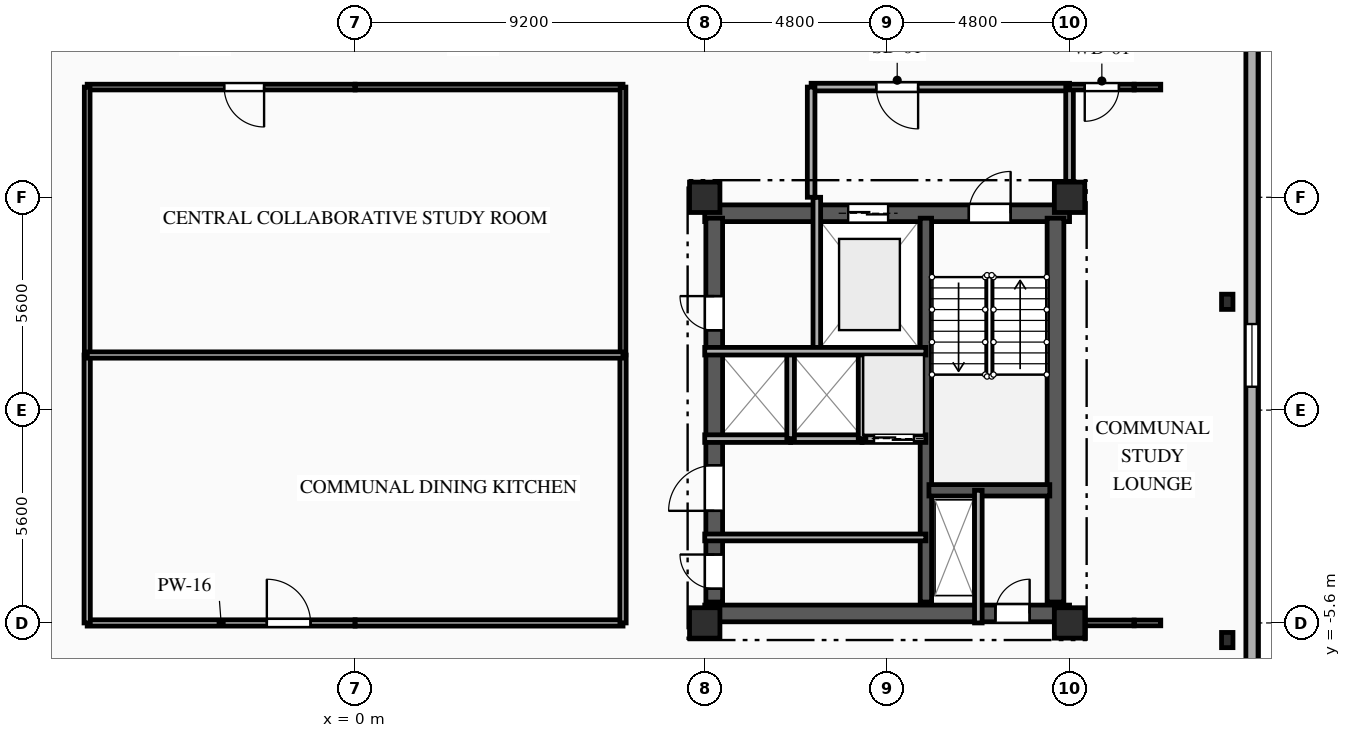
"""IFC4 building model, lengths in metres.
Left out: names, types, materials, properties, quantities, classifications, styles, units other than length and angle.
Written with IfcOpenShell. Run it as: python <this file> out.ifc"""

import sys

from ifc_helpers import new_model, si_unit, direction, frame, frame_2d, origin, origin_2d, place, context, subcontext, project, spatial, rectangle, i_section, extrude, element, fill, save


model = new_model("IFC4")
c1 = context("Model", 3, precision=1e-05, world=origin(), true_north=direction((0.0, 1.0)))
c2 = subcontext(c1, "Body", "Model", "MODEL_VIEW")
j1 = project(units=[si_unit("LENGTHUNIT", "METRE"), si_unit("PLANEANGLEUNIT", "RADIAN")], contexts=[c1])
p1 = place(None, origin())
s1 = spatial("IfcSite", under=j1, at=p1, CompositionType="ELEMENT")
p2 = place(p1, origin())
s2 = spatial("IfcBuilding", under=s1, at=p2, CompositionType="ELEMENT")
p3 = place(p2, frame((0.0, 0.0, 228.3)))
s3 = spatial("IfcBuildingStorey", under=s2, at=p3, CompositionType="ELEMENT", Elevation=228.3)
for number, where, z_axis, x_axis in (
    (1, (9.2, -5.6, 0.0), (0.0, 0.0, 1.0), (1.0, 0.0, 0.0)),
    (2, (9.2, 5.6, 0.0), (0.0, 0.0, 1.0), (1.0, 0.0, 0.0)),
    (3, (18.8, -5.6, 0.0), (0.0, 0.0, 1.0), (1.0, 0.0, 0.0)),
    (4, (18.8, 5.6, 0.0), (0.0, 0.0, 1.0), (1.0, 0.0, 0.0)),
):
    element("IfcColumn", number, at=place(p3, frame(where, z_axis=z_axis, x_axis=x_axis)), inside=s3, PredefinedType="COLUMN", context=c2, shape_type="SweptSolid", body=[
        extrude(rectangle(XDim=0.8, YDim=0.8, at=origin_2d()), origin(), (0.0, 0.0, 1.0), 3.35),
    ])
for number, where, z_axis, x_axis in (
    (5, (22.95, -6.05, 0.0), (0.0, 0.0, 1.0), (1.0, 0.0, 0.0)),
    (6, (22.95, 2.85, 0.0), (0.0, 0.0, 1.0), (1.0, 0.0, 0.0)),
):
    element("IfcColumn", number, at=place(p3, frame(where, z_axis=z_axis, x_axis=x_axis)), inside=s3, PredefinedType="COLUMN", context=c2, shape_type="SweptSolid", body=[
        extrude(i_section(OverallWidth=0.3, OverallDepth=0.4, WebThickness=0.013, FlangeThickness=0.024, FilletRadius=0.027, at=origin_2d()), origin(), (0.0, 0.0, 1.0), 3.35),
    ])
p4 = place(p3, frame((23.6, 12.4, 0.0), z_axis=(0.0, 0.0, 1.0), x_axis=(0.0, -1.0, 0.0)))
e7 = element("IfcWall", 7, at=p4, inside=s3, PredefinedType="SOLIDWALL", context=c2, shape_type="SweptSolid", body=[
    extrude(rectangle(XDim=28.0, YDim=0.32, at=frame_2d((14.0, 0.0))), origin(), (0.0, 0.0, 1.0), 3.04),
])
p5 = place(p4, frame((10.135, 0.0, 0.85)))
e8 = element("IfcOpeningElement", 8, at=p5, cuts=e7, PredefinedType="OPENING", context=c2, shape_type="SweptSolid", body=[
    extrude(rectangle(XDim=1.65, YDim=1.85, at=frame_2d((0.825, 0.925))), frame((0.0, 0.17, 0.0), z_axis=(0.0, -1.0, 0.0), x_axis=(1.0, 0.0, 0.0)), (0.0, 0.0, 1.0), 0.34),
])
p6 = place(p3, frame((9.2, 5.18, 0.0), z_axis=(0.0, 0.0, 1.0), x_axis=(1.0, 0.0, 0.0)))
e9 = element("IfcWall", 9, at=p6, inside=s3, PredefinedType="SHEAR", context=c2, shape_type="SweptSolid", body=[
    extrude(rectangle(XDim=9.6, YDim=0.44, at=frame_2d((4.8, 0.0))), origin(), (0.0, 0.0, 1.0), 3.04),
])
p7 = place(p6, frame((6.95, 0.0, 0.0)))
e10 = element("IfcOpeningElement", 10, at=p7, cuts=e9, PredefinedType="OPENING", context=c2, shape_type="SweptSolid", body=[
    extrude(rectangle(XDim=1.1, YDim=2.15, at=frame_2d((0.55, 1.075))), frame((0.0, 0.23, 0.0), z_axis=(0.0, -1.0, 0.0), x_axis=(1.0, 0.0, 0.0)), (0.0, 0.0, 1.0), 0.46),
])
p8 = place(p6, frame((3.775, 0.0, 0.0)))
e11 = element("IfcOpeningElement", 11, at=p8, cuts=e9, PredefinedType="OPENING", context=c2, shape_type="SweptSolid", body=[
    extrude(rectangle(XDim=1.05, YDim=2.1, at=frame_2d((0.525, 1.05))), frame((0.0, 0.23, 0.0), z_axis=(0.0, -1.0, 0.0), x_axis=(1.0, 0.0, 0.0)), (0.0, 0.0, 1.0), 0.46),
])
p9 = place(p3, frame((9.2, -5.35, 0.0), z_axis=(0.0, 0.0, 1.0), x_axis=(1.0, 0.0, 0.0)))
e12 = element("IfcWall", 12, at=p9, inside=s3, PredefinedType="SHEAR", context=c2, shape_type="SweptSolid", body=[
    extrude(rectangle(XDim=9.6, YDim=0.44, at=frame_2d((4.8, 0.0))), origin(), (0.0, 0.0, 1.0), 3.04),
])
p10 = place(p9, frame((7.65, 0.0, 0.0)))
e13 = element("IfcOpeningElement", 13, at=p10, cuts=e12, PredefinedType="OPENING", context=c2, shape_type="SweptSolid", body=[
    extrude(rectangle(XDim=0.9, YDim=2.1, at=frame_2d((0.45, 1.05))), frame((0.0, 0.23, 0.0), z_axis=(0.0, -1.0, 0.0), x_axis=(1.0, 0.0, 0.0)), (0.0, 0.0, 1.0), 0.46),
])
p11 = place(p3, frame((9.45, -5.05, 0.0), z_axis=(0.0, 0.0, 1.0), x_axis=(0.0, 1.0, 0.0)))
e14 = element("IfcWall", 14, at=p11, inside=s3, PredefinedType="SHEAR", context=c2, shape_type="SweptSolid", body=[
    extrude(rectangle(XDim=10.1, YDim=0.44, at=frame_2d((5.05, 0.0))), origin(), (0.0, 0.0, 1.0), 3.04),
])
p12 = place(p11, frame((7.15, 0.0, 0.0)))
e15 = element("IfcOpeningElement", 15, at=p12, cuts=e14, PredefinedType="OPENING", context=c2, shape_type="SweptSolid", body=[
    extrude(rectangle(XDim=0.9, YDim=2.1, at=frame_2d((0.45, 1.05))), frame((0.0, 0.23, 0.0), z_axis=(0.0, -1.0, 0.0), x_axis=(1.0, 0.0, 0.0)), (0.0, 0.0, 1.0), 0.46),
])
p13 = place(p11, frame((2.4, 0.0, 0.0)))
e16 = element("IfcOpeningElement", 16, at=p13, cuts=e14, PredefinedType="OPENING", context=c2, shape_type="SweptSolid", body=[
    extrude(rectangle(XDim=1.2, YDim=2.15, at=frame_2d((0.6, 1.075))), frame((0.0, 0.23, 0.0), z_axis=(0.0, -1.0, 0.0), x_axis=(1.0, 0.0, 0.0)), (0.0, 0.0, 1.0), 0.46),
])
p14 = place(p11, frame((0.35, 0.0, 0.0)))
e17 = element("IfcOpeningElement", 17, at=p14, cuts=e14, PredefinedType="OPENING", context=c2, shape_type="SweptSolid", body=[
    extrude(rectangle(XDim=0.9, YDim=2.1, at=frame_2d((0.45, 1.05))), frame((0.0, 0.23, 0.0), z_axis=(0.0, -1.0, 0.0), x_axis=(1.0, 0.0, 0.0)), (0.0, 0.0, 1.0), 0.46),
])
p15 = place(p3, frame((18.43, -5.05, 0.0), z_axis=(0.0, 0.0, 1.0), x_axis=(0.0, 1.0, 0.0)))
e18 = element("IfcWall", 18, at=p15, inside=s3, PredefinedType="SHEAR", context=c2, shape_type="SweptSolid", body=[
    extrude(rectangle(XDim=10.1, YDim=0.44, at=frame_2d((5.05, 0.0))), origin(), (0.0, 0.0, 1.0), 3.04),
])
p16 = place(p3, frame((15.02, -5.05, 0.0), z_axis=(0.0, 0.0, 1.0), x_axis=(0.0, 1.0, 0.0)))
e19 = element("IfcWall", 19, at=p16, inside=s3, PredefinedType="SHEAR", context=c2, shape_type="SweptSolid", body=[
    extrude(rectangle(XDim=10.1, YDim=0.3, at=frame_2d((5.05, 0.0))), origin(), (0.0, 0.0, 1.0), 3.04),
])
p17 = place(p3, frame((15.1, -2.11, 0.0), z_axis=(0.0, 0.0, 1.0), x_axis=(1.0, 0.0, 0.0)))
e20 = element("IfcWall", 20, at=p17, inside=s3, PredefinedType="SHEAR", context=c2, shape_type="SweptSolid", body=[
    extrude(rectangle(XDim=3.18, YDim=0.3, at=frame_2d((1.59, 0.0))), origin(), (0.0, 0.0, 1.0), 3.04),
])
p18 = place(p3, frame((16.4, -2.11, 0.0), z_axis=(0.0, 0.0, 1.0), x_axis=(0.0, -1.0, 0.0)))
e21 = element("IfcWall", 21, at=p18, inside=s3, PredefinedType="PARTITIONING", context=c2, shape_type="SweptSolid", body=[
    extrude(rectangle(XDim=3.49, YDim=0.2, at=frame_2d((1.745, 0.0))), origin(), (0.0, 0.0, 1.0), 3.04),
])
p19 = place(p3, frame((12.15, 5.6, 0.0), z_axis=(0.0, 0.0, 1.0), x_axis=(0.0, -1.0, 0.0)))
e22 = element("IfcWall", 22, at=p19, inside=s3, PredefinedType="PARTITIONING", context=c2, shape_type="SweptSolid", body=[
    extrude(rectangle(XDim=4.05, YDim=0.2, at=frame_2d((2.025, 0.0))), origin(), (0.0, 0.0, 1.0), 3.04),
])
p20 = place(p3, frame((18.8, 8.5, 0.0), z_axis=(0.0, 0.0, 1.0), x_axis=(-1.0, 0.0, 0.0)))
e23 = element("IfcWall", 23, at=p20, inside=s3, PredefinedType="PARTITIONING", context=c2, shape_type="SweptSolid", body=[
    extrude(rectangle(XDim=6.8, YDim=0.2, at=frame_2d((3.4, 0.0))), origin(), (0.0, 0.0, 1.0), 3.04),
])
p21 = place(p20, frame((3.985, 0.0, 0.0)))
e24 = element("IfcOpeningElement", 24, at=p21, cuts=e23, PredefinedType="OPENING", context=c2, shape_type="SweptSolid", body=[
    extrude(rectangle(XDim=1.1, YDim=2.15, at=frame_2d((0.55, 1.075))), frame((0.0, 0.11, 0.0), z_axis=(0.0, -1.0, 0.0), x_axis=(1.0, 0.0, 0.0)), (0.0, 0.0, 1.0), 0.22),
])
p22 = place(p3, frame((12.0, 8.5, 0.0), z_axis=(0.0, 0.0, 1.0), x_axis=(0.0, -1.0, 0.0)))
e25 = element("IfcWall", 25, at=p22, inside=s3, PredefinedType="PARTITIONING", context=c2, shape_type="SweptSolid", body=[
    extrude(rectangle(XDim=2.9, YDim=0.2, at=frame_2d((1.45, 0.0))), origin(), (0.0, 0.0, 1.0), 3.04),
])
p23 = place(p3, frame((18.8, 5.6, 0.0), z_axis=(0.0, 0.0, 1.0), x_axis=(0.0, 1.0, 0.0)))
e26 = element("IfcWall", 26, at=p23, inside=s3, PredefinedType="PARTITIONING", context=c2, shape_type="SweptSolid", body=[
    extrude(rectangle(XDim=2.9, YDim=0.2, at=frame_2d((1.45, 0.0))), origin(), (0.0, 0.0, 1.0), 2.665),
])
p24 = place(p3, frame((9.2, -3.35, 0.0), z_axis=(0.0, 0.0, 1.0), x_axis=(1.0, 0.0, 0.0)))
e27 = element("IfcWall", 27, at=p24, inside=s3, PredefinedType="PARTITIONING", context=c2, shape_type="SweptSolid", body=[
    extrude(rectangle(XDim=5.82, YDim=0.18, at=frame_2d((2.91, 0.0))), origin(), (0.0, 0.0, 1.0), 2.755),
])
p25 = place(p3, frame((11.46, -0.75, 0.0), z_axis=(0.0, 0.0, 1.0), x_axis=(-1.0, 0.0, 0.0)))
e28 = element("IfcWall", 28, at=p25, inside=s3, PredefinedType="PARTITIONING", context=c2, shape_type="SweptSolid", body=[
    extrude(rectangle(XDim=2.26, YDim=0.2, at=frame_2d((1.13, 0.0))), origin(), (0.0, 0.0, 1.0), 3.04),
])
p26 = place(p3, frame((13.34, -0.75, 0.0), z_axis=(0.0, 0.0, 1.0), x_axis=(-1.0, 0.0, 0.0)))
e29 = element("IfcWall", 29, at=p26, inside=s3, PredefinedType="PARTITIONING", context=c2, shape_type="SweptSolid", body=[
    extrude(rectangle(XDim=1.88, YDim=0.2, at=frame_2d((0.94, 0.0))), origin(), (0.0, 0.0, 1.0), 3.04),
])
p27 = place(p3, frame((15.02, -0.75, 0.0), z_axis=(0.0, 0.0, 1.0), x_axis=(-1.0, 0.0, 0.0)))
e30 = element("IfcWall", 30, at=p27, inside=s3, PredefinedType="PARTITIONING", context=c2, shape_type="SweptSolid", body=[
    extrude(rectangle(XDim=1.68, YDim=0.2, at=frame_2d((0.84, 0.0))), origin(), (0.0, 0.0, 1.0), 3.04),
])
p28 = place(p27, frame((0.315, 0.0, 0.0)))
e31 = element("IfcOpeningElement", 31, at=p28, cuts=e30, PredefinedType="OPENING", context=c2, shape_type="SweptSolid", body=[
    extrude(rectangle(XDim=1.05, YDim=2.1, at=frame_2d((0.525, 1.05))), frame((0.0, 0.11, 0.0), z_axis=(0.0, -1.0, 0.0), x_axis=(1.0, 0.0, 0.0)), (0.0, 0.0, 1.0), 0.22),
])
for number, where, z_axis, x_axis in (
    (32, (11.46, -0.75, 0.0), (0.0, 0.0, 1.0), (0.0, 1.0, 0.0)),
    (33, (13.34, -0.75, 0.0), (0.0, 0.0, 1.0), (0.0, 1.0, 0.0)),
):
    element("IfcWall", number, at=place(p3, frame(where, z_axis=z_axis, x_axis=x_axis)), inside=s3, PredefinedType="PARTITIONING", context=c2, shape_type="SweptSolid", body=[
        extrude(rectangle(XDim=2.3, YDim=0.2, at=frame_2d((1.15, 0.0))), origin(), (0.0, 0.0, 1.0), 3.04),
    ])
p29 = place(p3, frame((0.0, 8.5, 0.0), z_axis=(0.0, 0.0, 1.0), x_axis=(-1.0, 0.0, 0.0)))
e34 = element("IfcWall", 34, at=p29, inside=s3, PredefinedType="PARTITIONING", context=c2, shape_type="SweptSolid", body=[
    extrude(rectangle(XDim=7.05, YDim=0.15, at=frame_2d((3.525, 0.0))), origin(), (0.0, 0.0, 1.0), 3.04),
])
p30 = place(p29, frame((2.395, 0.0, 0.0)))
e35 = element("IfcOpeningElement", 35, at=p30, cuts=e34, PredefinedType="OPENING", context=c2, shape_type="SweptSolid", body=[
    extrude(rectangle(XDim=1.05, YDim=2.15, at=frame_2d((0.525, 1.075))), frame((0.0, 0.085, 0.0), z_axis=(0.0, -1.0, 0.0), x_axis=(1.0, 0.0, 0.0)), (0.0, 0.0, 1.0), 0.17),
])
p31 = place(p3, frame((20.5, 8.5, 0.0), z_axis=(0.0, 0.0, 1.0), x_axis=(-1.0, 0.0, 0.0)))
e36 = element("IfcWall", 36, at=p31, inside=s3, PredefinedType="PARTITIONING", context=c2, shape_type="SweptSolid", body=[
    extrude(rectangle(XDim=1.7, YDim=0.15, at=frame_2d((0.85, 0.0))), origin(), (0.0, 0.0, 1.0), 3.04),
])
p32 = place(p31, frame((0.4, 0.0, 0.0)))
e37 = element("IfcOpeningElement", 37, at=p32, cuts=e36, PredefinedType="OPENING", context=c2, shape_type="SweptSolid", body=[
    extrude(rectangle(XDim=0.9, YDim=2.1, at=frame_2d((0.45, 1.05))), frame((0.0, 0.085, 0.0), z_axis=(0.0, -1.0, 0.0), x_axis=(1.0, 0.0, 0.0)), (0.0, 0.0, 1.0), 0.17),
])
p33 = place(p3, frame((21.2, 8.5, 0.0), z_axis=(0.0, 0.0, 1.0), x_axis=(-1.0, 0.0, 0.0)))
e38 = element("IfcWall", 38, at=p33, inside=s3, PredefinedType="PARTITIONING", context=c2, shape_type="SweptSolid", body=[
    extrude(rectangle(XDim=0.7, YDim=0.15, at=frame_2d((0.35, 0.0))), origin(), (0.0, 0.0, 1.0), 3.04),
])
p34 = place(p3, frame((7.05, 8.5, 0.0), z_axis=(0.0, 0.0, 1.0), x_axis=(-1.0, 0.0, 0.0)))
e39 = element("IfcWall", 39, at=p34, inside=s3, PredefinedType="PARTITIONING", context=c2, shape_type="SweptSolid", body=[
    extrude(rectangle(XDim=7.05, YDim=0.15, at=frame_2d((3.525, 0.0))), origin(), (0.0, 0.0, 1.0), 3.04),
])
p35 = place(p3, frame((-7.05, -5.6, 0.0), z_axis=(0.0, 0.0, 1.0), x_axis=(1.0, 0.0, 0.0)))
e40 = element("IfcWall", 40, at=p35, inside=s3, PredefinedType="PARTITIONING", context=c2, shape_type="SweptSolid", body=[
    extrude(rectangle(XDim=7.05, YDim=0.165, at=frame_2d((3.525, 0.0))), origin(), (0.0, 0.0, 1.0), 2.525),
])
p36 = place(p35, frame((4.728, 0.0, 0.0)))
e41 = element("IfcOpeningElement", 41, at=p36, cuts=e40, PredefinedType="OPENING", context=c2, shape_type="SweptSolid", body=[
    extrude(rectangle(XDim=1.15, YDim=2.15, at=frame_2d((0.575, 1.075))), frame((0.0, 0.093, 0.0), z_axis=(0.0, -1.0, 0.0), x_axis=(1.0, 0.0, 0.0)), (0.0, 0.0, 1.0), 0.185),
])
p37 = place(p3, frame((18.8, -5.6, 0.0), z_axis=(0.0, 0.0, 1.0), x_axis=(1.0, 0.0, 0.0)))
e42 = element("IfcWall", 42, at=p37, inside=s3, PredefinedType="PARTITIONING", context=c2, shape_type="SweptSolid", body=[
    extrude(rectangle(XDim=1.7, YDim=0.15, at=frame_2d((0.85, 0.0))), origin(), (0.0, 0.0, 1.0), 3.04),
])
p38 = place(p3, frame((20.5, -5.6, 0.0), z_axis=(0.0, 0.0, 1.0), x_axis=(1.0, 0.0, 0.0)))
e43 = element("IfcWall", 43, at=p38, inside=s3, PredefinedType="PARTITIONING", context=c2, shape_type="SweptSolid", body=[
    extrude(rectangle(XDim=0.7, YDim=0.15, at=frame_2d((0.35, 0.0))), origin(), (0.0, 0.0, 1.0), 3.04),
])
p39 = place(p3, frame((0.0, -5.6, 0.0), z_axis=(0.0, 0.0, 1.0), x_axis=(1.0, 0.0, 0.0)))
e44 = element("IfcWall", 44, at=p39, inside=s3, PredefinedType="PARTITIONING", context=c2, shape_type="SweptSolid", body=[
    extrude(rectangle(XDim=7.05, YDim=0.165, at=frame_2d((3.525, 0.0))), origin(), (0.0, 0.0, 1.0), 2.525),
])
p40 = place(p3, frame((-7.05, 1.45, 0.0), z_axis=(0.0, 0.0, 1.0), x_axis=(0.0, -1.0, 0.0)))
e45 = element("IfcWall", 45, at=p40, inside=s3, PredefinedType="PARTITIONING", context=c2, shape_type="SweptSolid", body=[
    extrude(rectangle(XDim=7.05, YDim=0.165, at=frame_2d((3.525, 0.0))), origin(), (0.0, 0.0, 1.0), 3.04),
])
p41 = place(p3, frame((-7.05, 8.5, 0.0), z_axis=(0.0, 0.0, 1.0), x_axis=(0.0, -1.0, 0.0)))
e46 = element("IfcWall", 46, at=p41, inside=s3, PredefinedType="PARTITIONING", context=c2, shape_type="SweptSolid", body=[
    extrude(rectangle(XDim=7.05, YDim=0.15, at=frame_2d((3.525, 0.0))), origin(), (0.0, 0.0, 1.0), 3.04),
])
p42 = place(p3, frame((7.05, -5.6, 0.0), z_axis=(0.0, 0.0, 1.0), x_axis=(0.0, 1.0, 0.0)))
e47 = element("IfcWall", 47, at=p42, inside=s3, PredefinedType="PARTITIONING", context=c2, shape_type="SweptSolid", body=[
    extrude(rectangle(XDim=7.05, YDim=0.165, at=frame_2d((3.525, 0.0))), origin(), (0.0, 0.0, 1.0), 3.04),
])
p43 = place(p3, frame((7.05, 1.45, 0.0), z_axis=(0.0, 0.0, 1.0), x_axis=(0.0, 1.0, 0.0)))
e48 = element("IfcWall", 48, at=p43, inside=s3, PredefinedType="PARTITIONING", context=c2, shape_type="SweptSolid", body=[
    extrude(rectangle(XDim=7.05, YDim=0.15, at=frame_2d((3.525, 0.0))), origin(), (0.0, 0.0, 1.0), 3.04),
])
p44 = place(p3, frame((-7.05, 1.45, 0.0), z_axis=(0.0, 0.0, 1.0), x_axis=(1.0, 0.0, 0.0)))
e49 = element("IfcWall", 49, at=p44, inside=s3, PredefinedType="PARTITIONING", context=c2, shape_type="SweptSolid", body=[
    extrude(rectangle(XDim=14.1, YDim=0.165, at=frame_2d((7.05, 0.0))), origin(), (0.0, 0.0, 1.0), 3.04),
])
p45 = place(p3, frame((9.2, 1.55, 0.0), z_axis=(0.0, 0.0, 1.0), x_axis=(1.0, 0.0, 0.0)))
e50 = element("IfcWall", 50, at=p45, inside=s3, PredefinedType="PARTITIONING", context=c2, shape_type="SweptSolid", body=[
    extrude(rectangle(XDim=5.82, YDim=0.2, at=frame_2d((2.91, 0.0))), origin(), (0.0, 0.0, 1.0), 3.04),
])
p46 = place(p5, origin())
e51 = element("IfcWindow", 51, at=p46, inside=s3, PartitioningType="SINGLE_PANEL", PredefinedType="WINDOW", context=c2, shape_type="SweptSolid", body=[
    extrude(rectangle(XDim=1.65, YDim=1.85, at=frame_2d((0.825, 0.925))), frame((0.0, 0.03, 0.0), z_axis=(0.0, -1.0, 0.0), x_axis=(1.0, 0.0, 0.0)), (0.0, 0.0, 1.0), 0.06),
])
fill(e8, e51)
p47 = place(p7, origin())
e52 = element("IfcDoor", 52, at=p47, inside=s3, OperationType="SINGLE_SWING_RIGHT", PredefinedType="DOOR", context=c2, shape_type="SweptSolid", body=[
    extrude(rectangle(XDim=1.1, YDim=2.15, at=frame_2d((0.55, 1.075))), frame((0.0, 0.025, 0.0), z_axis=(0.0, -1.0, 0.0), x_axis=(1.0, 0.0, 0.0)), (0.0, 0.0, 1.0), 0.05),
])
fill(e10, e52)
p48 = place(p8, origin())
e53 = element("IfcDoor", 53, at=p48, inside=s3, OperationType="DOUBLE_DOOR_SLIDING", PredefinedType="DOOR", context=c2, shape_type="SweptSolid", body=[
    extrude(rectangle(XDim=1.05, YDim=2.1, at=frame_2d((0.525, 1.05))), frame((0.0, 0.025, 0.0), z_axis=(0.0, -1.0, 0.0), x_axis=(1.0, 0.0, 0.0)), (0.0, 0.0, 1.0), 0.05),
])
fill(e11, e53)
p49 = place(p10, origin())
e54 = element("IfcDoor", 54, at=p49, inside=s3, OperationType="SINGLE_SWING_RIGHT", PredefinedType="DOOR", context=c2, shape_type="SweptSolid", body=[
    extrude(rectangle(XDim=0.9, YDim=2.1, at=frame_2d((0.45, 1.05))), frame((0.0, 0.025, 0.0), z_axis=(0.0, -1.0, 0.0), x_axis=(1.0, 0.0, 0.0)), (0.0, 0.0, 1.0), 0.05),
])
fill(e13, e54)
p50 = place(p21, origin())
e55 = element("IfcDoor", 55, at=p50, inside=s3, OperationType="SINGLE_SWING_LEFT", PredefinedType="DOOR", context=c2, shape_type="SweptSolid", body=[
    extrude(rectangle(XDim=1.1, YDim=2.15, at=frame_2d((0.55, 1.075))), frame((0.0, 0.025, 0.0), z_axis=(0.0, -1.0, 0.0), x_axis=(1.0, 0.0, 0.0)), (0.0, 0.0, 1.0), 0.05),
])
fill(e24, e55)
p51 = place(p12, origin())
e56 = element("IfcDoor", 56, at=p51, inside=s3, OperationType="SINGLE_SWING_RIGHT", PredefinedType="DOOR", context=c2, shape_type="SweptSolid", body=[
    extrude(rectangle(XDim=0.9, YDim=2.1, at=frame_2d((0.45, 1.05))), frame((0.0, 0.025, 0.0), z_axis=(0.0, -1.0, 0.0), x_axis=(1.0, 0.0, 0.0)), (0.0, 0.0, 1.0), 0.05),
])
fill(e15, e56)
p52 = place(p28, origin())
e57 = element("IfcDoor", 57, at=p52, inside=s3, OperationType="DOUBLE_DOOR_SLIDING", PredefinedType="DOOR", context=c2, shape_type="SweptSolid", body=[
    extrude(rectangle(XDim=1.05, YDim=2.1, at=frame_2d((0.525, 1.05))), frame((0.0, 0.025, 0.0), z_axis=(0.0, -1.0, 0.0), x_axis=(1.0, 0.0, 0.0)), (0.0, 0.0, 1.0), 0.05),
])
fill(e31, e57)
p53 = place(p13, origin())
e58 = element("IfcDoor", 58, at=p53, inside=s3, OperationType="SINGLE_SWING_LEFT", PredefinedType="DOOR", context=c2, shape_type="SweptSolid", body=[
    extrude(rectangle(XDim=1.2, YDim=2.15, at=frame_2d((0.6, 1.075))), frame((0.0, 0.025, 0.0), z_axis=(0.0, -1.0, 0.0), x_axis=(1.0, 0.0, 0.0)), (0.0, 0.0, 1.0), 0.05),
])
fill(e16, e58)
p54 = place(p14, origin())
e59 = element("IfcDoor", 59, at=p54, inside=s3, OperationType="SINGLE_SWING_RIGHT", PredefinedType="DOOR", context=c2, shape_type="SweptSolid", body=[
    extrude(rectangle(XDim=0.9, YDim=2.1, at=frame_2d((0.45, 1.05))), frame((0.0, 0.025, 0.0), z_axis=(0.0, -1.0, 0.0), x_axis=(1.0, 0.0, 0.0)), (0.0, 0.0, 1.0), 0.05),
])
fill(e17, e59)
p55 = place(p30, origin())
e60 = element("IfcDoor", 60, at=p55, inside=s3, OperationType="SINGLE_SWING_LEFT", PredefinedType="DOOR", context=c2, shape_type="SweptSolid", body=[
    extrude(rectangle(XDim=1.05, YDim=2.15, at=frame_2d((0.525, 1.075))), frame((0.0, 0.025, 0.0), z_axis=(0.0, -1.0, 0.0), x_axis=(1.0, 0.0, 0.0)), (0.0, 0.0, 1.0), 0.05),
])
fill(e35, e60)
p56 = place(p32, origin())
e61 = element("IfcDoor", 61, at=p56, inside=s3, OperationType="SINGLE_SWING_RIGHT", PredefinedType="DOOR", context=c2, shape_type="SweptSolid", body=[
    extrude(rectangle(XDim=0.9, YDim=2.1, at=frame_2d((0.45, 1.05))), frame((0.0, 0.025, 0.0), z_axis=(0.0, -1.0, 0.0), x_axis=(1.0, 0.0, 0.0)), (0.0, 0.0, 1.0), 0.05),
])
fill(e37, e61)
p57 = place(p36, origin())
e62 = element("IfcDoor", 62, at=p57, inside=s3, OperationType="SINGLE_SWING_LEFT", PredefinedType="DOOR", context=c2, shape_type="SweptSolid", body=[
    extrude(rectangle(XDim=1.15, YDim=2.15, at=frame_2d((0.575, 1.075))), frame((0.0, 0.025, 0.0), z_axis=(0.0, -1.0, 0.0), x_axis=(1.0, 0.0, 0.0)), (0.0, 0.0, 1.0), 0.05),
])
fill(e41, e62)
save(model, sys.argv[1])
